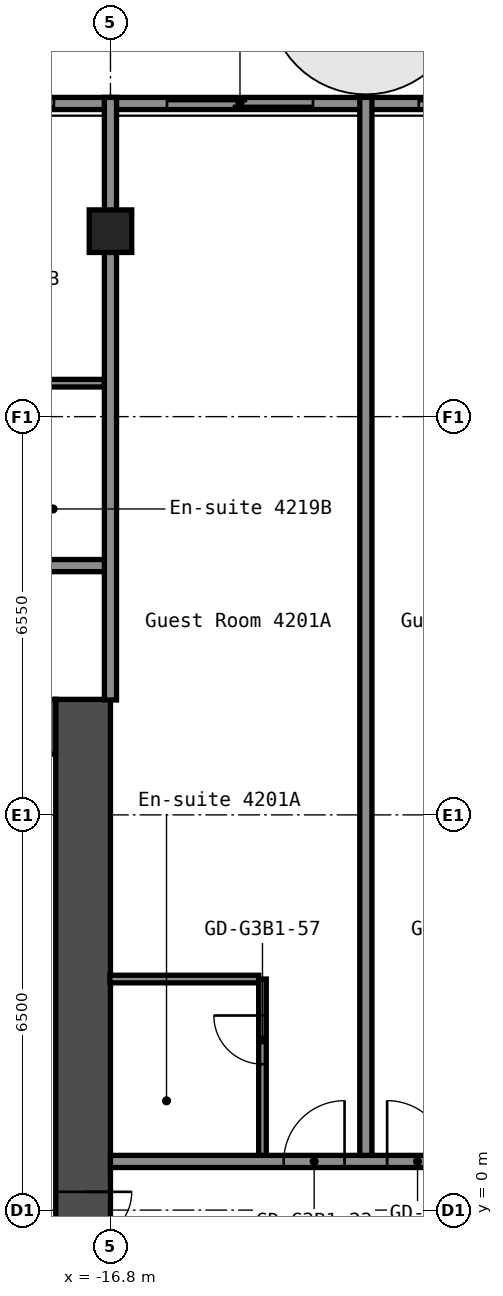
"""IFC4 building model, lengths in metres.
Left out: names, types, materials, properties, quantities, classifications, styles, units other than length and angle.
Written with IfcOpenShell. Run it as: python <this file> out.ifc"""

import sys

from ifc_helpers import new_model, si_unit, direction, frame, frame_2d, origin, origin_2d, place, context, subcontext, project, spatial, rectangle, hollow_rectangle, extrude, element, fill, save


model = new_model("IFC4")
c1 = context("Model", 3, precision=1e-05, world=origin(), true_north=direction((0.0, 1.0)))
c2 = subcontext(c1, "Body", "Model", "MODEL_VIEW")
j1 = project(units=[si_unit("LENGTHUNIT", "METRE"), si_unit("PLANEANGLEUNIT", "RADIAN")], contexts=[c1])
p1 = place(None, origin())
s1 = spatial("IfcSite", under=j1, at=p1, CompositionType="ELEMENT")
p2 = place(p1, origin())
s2 = spatial("IfcBuilding", under=s1, at=p2, CompositionType="ELEMENT")
p3 = place(p2, frame((0.0, 0.0, 150.2)))
s3 = spatial("IfcBuildingStorey", under=s2, at=p3, CompositionType="ELEMENT", Elevation=150.2)
p4 = place(p3, frame((-16.8, 16.1, 0.0), z_axis=(0.0, 0.0, 1.0), x_axis=(1.0, 0.0, 0.0)))
e1 = element("IfcColumn", 1, at=p4, inside=s3, PredefinedType="COLUMN", context=c2, shape_type="SweptSolid", body=[
    extrude(hollow_rectangle(XDim=0.7, YDim=0.7, WallThickness=0.028, at=origin_2d()), origin(), (0.0, 0.0, 1.0), 2.75),
])
p5 = place(p3, frame((-17.25, -8.4, 0.0), z_axis=(0.0, 0.0, 1.0), x_axis=(0.0, 1.0, 0.0)))
e2 = element("IfcWall", 2, at=p5, inside=s3, PredefinedType="SHEAR", context=c2, shape_type="SweptSolid", body=[
    extrude(rectangle(XDim=16.8, YDim=0.9, at=frame_2d((8.4, 0.0))), origin(), (0.0, 0.0, 1.0), 2.75),
])
p6 = place(p5, frame((7.1, 0.0, 0.0)))
e3 = element("IfcOpeningElement", 3, at=p6, cuts=e2, PredefinedType="OPENING", context=c2, shape_type="SweptSolid", body=[
    extrude(rectangle(XDim=1.6, YDim=2.1, at=frame_2d((0.8, 1.05))), frame((0.0, 0.46, 0.0), z_axis=(0.0, -1.0, 0.0), x_axis=(1.0, 0.0, 0.0)), (0.0, 0.0, 1.0), 0.92),
])
p7 = place(p3, frame((-32.7, 7.95, 0.0), z_axis=(0.0, 0.0, 1.0), x_axis=(1.0, 0.0, 0.0)))
e4 = element("IfcWall", 4, at=p7, inside=s3, PredefinedType="SHEAR", context=c2, shape_type="SweptSolid", body=[
    extrude(rectangle(XDim=15.0, YDim=0.9, at=frame_2d((7.5, 0.0))), origin(), (0.0, 0.0, 1.0), 2.75),
])
p8 = place(p7, frame((3.4, 0.0, 0.0)))
e5 = element("IfcOpeningElement", 5, at=p8, cuts=e4, PredefinedType="OPENING", context=c2, shape_type="SweptSolid", body=[
    extrude(rectangle(XDim=1.2, YDim=2.1, at=frame_2d((0.6, 1.05))), frame((0.0, 0.46, 0.0), z_axis=(0.0, -1.0, 0.0), x_axis=(1.0, 0.0, 0.0)), (0.0, 0.0, 1.0), 0.92),
])
p9 = place(p7, frame((0.75, 0.0, 0.0)))
e6 = element("IfcOpeningElement", 6, at=p9, cuts=e4, PredefinedType="OPENING", context=c2, shape_type="SweptSolid", body=[
    extrude(rectangle(XDim=0.9, YDim=2.1, at=frame_2d((0.45, 1.05))), frame((0.0, 0.46, 0.0), z_axis=(0.0, -1.0, 0.0), x_axis=(1.0, 0.0, 0.0)), (0.0, 0.0, 1.0), 0.92),
])
p10 = place(p3, frame((-16.8, 0.8, 0.0), z_axis=(0.0, 0.0, 1.0), x_axis=(1.0, 0.0, 0.0)))
e7 = element("IfcWall", 7, at=p10, inside=s3, PredefinedType="PARTITIONING", context=c2, shape_type="SweptSolid", body=[
    extrude(rectangle(XDim=33.6, YDim=0.2, at=frame_2d((16.8, 0.0))), origin(), (0.0, 0.0, 1.0), 2.75),
])
p11 = place(p10, frame((2.85, 0.0, 0.0)))
e8 = element("IfcOpeningElement", 8, at=p11, cuts=e7, PredefinedType="OPENING", context=c2, shape_type="SweptSolid", body=[
    extrude(rectangle(XDim=1.0, YDim=2.1, at=frame_2d((0.5, 1.05))), frame((0.0, 0.11, 0.0), z_axis=(0.0, -1.0, 0.0), x_axis=(1.0, 0.0, 0.0)), (0.0, 0.0, 1.0), 0.22),
])
p12 = place(p10, frame((4.55, 0.0, 0.0)))
e9 = element("IfcOpeningElement", 9, at=p12, cuts=e7, PredefinedType="OPENING", context=c2, shape_type="SweptSolid", body=[
    extrude(rectangle(XDim=1.0, YDim=2.1, at=frame_2d((0.5, 1.05))), frame((0.0, 0.11, 0.0), z_axis=(0.0, -1.0, 0.0), x_axis=(1.0, 0.0, 0.0)), (0.0, 0.0, 1.0), 0.22),
])
p13 = place(p10, frame((10.22, 0.0, 0.0)))
e10 = element("IfcOpeningElement", 10, at=p13, cuts=e7, PredefinedType="OPENING", context=c2, shape_type="SweptSolid", body=[
    extrude(rectangle(XDim=0.9, YDim=2.1, at=frame_2d((0.45, 1.05))), frame((0.0, 0.11, 0.0), z_axis=(0.0, -1.0, 0.0), x_axis=(1.0, 0.0, 0.0)), (0.0, 0.0, 1.0), 0.22),
])
p14 = place(p10, frame((14.42, 0.0, 0.0)))
e11 = element("IfcOpeningElement", 11, at=p14, cuts=e7, PredefinedType="OPENING", context=c2, shape_type="SweptSolid", body=[
    extrude(rectangle(XDim=0.9, YDim=2.1, at=frame_2d((0.45, 1.05))), frame((0.0, 0.11, 0.0), z_axis=(0.0, -1.0, 0.0), x_axis=(1.0, 0.0, 0.0)), (0.0, 0.0, 1.0), 0.22),
])
p15 = place(p10, frame((19.65, 0.0, 0.0)))
e12 = element("IfcOpeningElement", 12, at=p15, cuts=e7, PredefinedType="OPENING", context=c2, shape_type="SweptSolid", body=[
    extrude(rectangle(XDim=1.0, YDim=2.1, at=frame_2d((0.5, 1.05))), frame((0.0, 0.11, 0.0), z_axis=(0.0, -1.0, 0.0), x_axis=(1.0, 0.0, 0.0)), (0.0, 0.0, 1.0), 0.22),
])
p16 = place(p10, frame((21.35, 0.0, 0.0)))
e13 = element("IfcOpeningElement", 13, at=p16, cuts=e7, PredefinedType="OPENING", context=c2, shape_type="SweptSolid", body=[
    extrude(rectangle(XDim=1.0, YDim=2.1, at=frame_2d((0.5, 1.05))), frame((0.0, 0.11, 0.0), z_axis=(0.0, -1.0, 0.0), x_axis=(1.0, 0.0, 0.0)), (0.0, 0.0, 1.0), 0.22),
])
p17 = place(p10, frame((28.05, 0.0, 0.0)))
e14 = element("IfcOpeningElement", 14, at=p17, cuts=e7, PredefinedType="OPENING", context=c2, shape_type="SweptSolid", body=[
    extrude(rectangle(XDim=1.0, YDim=2.1, at=frame_2d((0.5, 1.05))), frame((0.0, 0.11, 0.0), z_axis=(0.0, -1.0, 0.0), x_axis=(1.0, 0.0, 0.0)), (0.0, 0.0, 1.0), 0.22),
])
p18 = place(p10, frame((29.75, 0.0, 0.0)))
e15 = element("IfcOpeningElement", 15, at=p18, cuts=e7, PredefinedType="OPENING", context=c2, shape_type="SweptSolid", body=[
    extrude(rectangle(XDim=1.0, YDim=2.1, at=frame_2d((0.5, 1.05))), frame((0.0, 0.11, 0.0), z_axis=(0.0, -1.0, 0.0), x_axis=(1.0, 0.0, 0.0)), (0.0, 0.0, 1.0), 0.22),
])
p19 = place(p3, frame((-16.81, 3.8, 0.0), z_axis=(0.0, 0.0, 1.0), x_axis=(1.0, 0.0, 0.0)))
e16 = element("IfcWall", 16, at=p19, inside=s3, PredefinedType="PARTITIONING", context=c2, shape_type="SweptSolid", body=[
    extrude(rectangle(XDim=2.448, YDim=0.125, at=frame_2d((1.224, 0.0))), origin(), (0.0, 0.0, 1.0), 2.75),
])
p20 = place(p3, frame((-42.7, 10.6, 0.0), z_axis=(0.0, 0.0, 1.0), x_axis=(1.0, 0.0, 0.0)))
e17 = element("IfcWall", 17, at=p20, inside=s3, PredefinedType="PARTITIONING", context=c2, shape_type="SweptSolid", body=[
    extrude(rectangle(XDim=25.9, YDim=0.2, at=frame_2d((12.95, 0.0))), origin(), (0.0, 0.0, 1.0), 2.75),
])
p21 = place(p20, frame((3.25, 0.0, 0.0)))
e18 = element("IfcOpeningElement", 18, at=p21, cuts=e17, PredefinedType="OPENING", context=c2, shape_type="SweptSolid", body=[
    extrude(rectangle(XDim=1.0, YDim=2.1, at=frame_2d((0.5, 1.05))), frame((0.0, 0.11, 0.0), z_axis=(0.0, -1.0, 0.0), x_axis=(1.0, 0.0, 0.0)), (0.0, 0.0, 1.0), 0.22),
])
p22 = place(p20, frame((5.15, 0.0, 0.0)))
e19 = element("IfcOpeningElement", 19, at=p22, cuts=e17, PredefinedType="OPENING", context=c2, shape_type="SweptSolid", body=[
    extrude(rectangle(XDim=1.0, YDim=2.1, at=frame_2d((0.5, 1.05))), frame((0.0, 0.11, 0.0), z_axis=(0.0, -1.0, 0.0), x_axis=(1.0, 0.0, 0.0)), (0.0, 0.0, 1.0), 0.22),
])
p23 = place(p20, frame((11.95, 0.0, 0.0)))
e20 = element("IfcOpeningElement", 20, at=p23, cuts=e17, PredefinedType="OPENING", context=c2, shape_type="SweptSolid", body=[
    extrude(rectangle(XDim=1.0, YDim=2.1, at=frame_2d((0.5, 1.05))), frame((0.0, 0.11, 0.0), z_axis=(0.0, -1.0, 0.0), x_axis=(1.0, 0.0, 0.0)), (0.0, 0.0, 1.0), 0.22),
])
p24 = place(p20, frame((13.65, 0.0, 0.0)))
e21 = element("IfcOpeningElement", 21, at=p24, cuts=e17, PredefinedType="OPENING", context=c2, shape_type="SweptSolid", body=[
    extrude(rectangle(XDim=1.0, YDim=2.1, at=frame_2d((0.5, 1.05))), frame((0.0, 0.11, 0.0), z_axis=(0.0, -1.0, 0.0), x_axis=(1.0, 0.0, 0.0)), (0.0, 0.0, 1.0), 0.22),
])
p25 = place(p20, frame((20.35, 0.0, 0.0)))
e22 = element("IfcOpeningElement", 22, at=p25, cuts=e17, PredefinedType="OPENING", context=c2, shape_type="SweptSolid", body=[
    extrude(rectangle(XDim=1.0, YDim=2.1, at=frame_2d((0.5, 1.05))), frame((0.0, 0.11, 0.0), z_axis=(0.0, -1.0, 0.0), x_axis=(1.0, 0.0, 0.0)), (0.0, 0.0, 1.0), 0.22),
])
p26 = place(p20, frame((22.05, 0.0, 0.0)))
e23 = element("IfcOpeningElement", 23, at=p26, cuts=e17, PredefinedType="OPENING", context=c2, shape_type="SweptSolid", body=[
    extrude(rectangle(XDim=1.0, YDim=2.1, at=frame_2d((0.5, 1.05))), frame((0.0, 0.11, 0.0), z_axis=(0.0, -1.0, 0.0), x_axis=(1.0, 0.0, 0.0)), (0.0, 0.0, 1.0), 0.22),
])
p27 = place(p3, frame((-19.238, 13.6, 0.0), z_axis=(0.0, 0.0, 1.0), x_axis=(1.0, 0.0, 0.0)))
e24 = element("IfcWall", 24, at=p27, inside=s3, PredefinedType="PARTITIONING", context=c2, shape_type="SweptSolid", body=[
    extrude(rectangle(XDim=2.338, YDim=0.125, at=frame_2d((1.169, 0.0))), origin(), (0.0, 0.0, 1.0), 2.75),
])
p28 = place(p3, frame((-16.8, 8.39, 0.0), z_axis=(0.0, 0.0, 1.0), x_axis=(0.0, 1.0, 0.0)))
e25 = element("IfcWall", 25, at=p28, inside=s3, PredefinedType="PARTITIONING", context=c2, shape_type="SweptSolid", body=[
    extrude(rectangle(XDim=9.91, YDim=0.2, at=frame_2d((4.955, 0.0))), origin(), (0.0, 0.0, 1.0), 2.75),
])
p29 = place(p3, frame((-14.3, 0.9, 0.0), z_axis=(0.0, 0.0, 1.0), x_axis=(0.0, 1.0, 0.0)))
e26 = element("IfcWall", 26, at=p29, inside=s3, PredefinedType="PARTITIONING", context=c2, shape_type="SweptSolid", body=[
    extrude(rectangle(XDim=2.9, YDim=0.125, at=frame_2d((1.45, 0.0))), origin(), (0.0, 0.0, 1.0), 2.75),
])
p30 = place(p29, frame((1.5, 0.0, 0.0)))
e27 = element("IfcOpeningElement", 27, at=p30, cuts=e26, PredefinedType="OPENING", context=c2, shape_type="SweptSolid", body=[
    extrude(rectangle(XDim=0.8, YDim=2.1, at=frame_2d((0.4, 1.05))), frame((0.0, 0.073, 0.0), z_axis=(0.0, -1.0, 0.0), x_axis=(1.0, 0.0, 0.0)), (0.0, 0.0, 1.0), 0.145),
])
p31 = place(p3, frame((-12.6, 0.9, 0.0), z_axis=(0.0, 0.0, 1.0), x_axis=(0.0, 1.0, 0.0)))
e28 = element("IfcWall", 28, at=p31, inside=s3, PredefinedType="PARTITIONING", context=c2, shape_type="SweptSolid", body=[
    extrude(rectangle(XDim=17.4, YDim=0.2, at=frame_2d((8.7, 0.0))), origin(), (0.0, 0.0, 1.0), 2.75),
])
p32 = place(p3, frame((-8.42, 18.2, 0.0), z_axis=(0.0, 0.0, 1.0), x_axis=(-1.0, 0.0, 0.0)))
p33 = place(p32, frame((0.91, 0.0, 0.0)))
p34 = place(p33, frame((2.4, 0.0, 0.0), z_axis=(0.0, 0.0, 1.0), x_axis=(-1.0, 0.0, 0.0)))
e29 = element("IfcDoor", 29, at=p34, inside=s3, OperationType="SLIDING_TO_LEFT", PredefinedType="DOOR", context=c2, shape_type="SweptSolid", body=[
    extrude(rectangle(XDim=2.4, YDim=2.2, at=frame_2d((1.2, 1.1))), frame((0.0, 0.025, 0.0), z_axis=(0.0, -1.0, 0.0), x_axis=(1.0, 0.0, 0.0)), (0.0, 0.0, 1.0), 0.05),
])
p35 = place(p3, frame((-12.56, 18.2, 0.0), z_axis=(0.0, 0.0, 1.0), x_axis=(-1.0, 0.0, 0.0)))
p36 = place(p35, frame((0.91, 0.0, 0.0)))
p37 = place(p36, frame((2.4, 0.0, 0.0), z_axis=(0.0, 0.0, 1.0), x_axis=(-1.0, 0.0, 0.0)))
e30 = element("IfcDoor", 30, at=p37, inside=s3, OperationType="SLIDING_TO_LEFT", PredefinedType="DOOR", context=c2, shape_type="SweptSolid", body=[
    extrude(rectangle(XDim=2.4, YDim=2.2, at=frame_2d((1.2, 1.1))), frame((0.0, 0.025, 0.0), z_axis=(0.0, -1.0, 0.0), x_axis=(1.0, 0.0, 0.0)), (0.0, 0.0, 1.0), 0.05),
])
p38 = place(p3, frame((-16.82, 18.2, 0.0), z_axis=(0.0, 0.0, 1.0), x_axis=(-1.0, 0.0, 0.0)))
p39 = place(p38, frame((0.91, 0.0, 0.0)))
p40 = place(p39, frame((2.4, 0.0, 0.0), z_axis=(0.0, 0.0, 1.0), x_axis=(-1.0, 0.0, 0.0)))
e31 = element("IfcDoor", 31, at=p40, inside=s3, OperationType="SLIDING_TO_LEFT", PredefinedType="DOOR", context=c2, shape_type="SweptSolid", body=[
    extrude(rectangle(XDim=2.4, YDim=2.2, at=frame_2d((1.2, 1.1))), frame((0.0, 0.025, 0.0), z_axis=(0.0, -1.0, 0.0), x_axis=(1.0, 0.0, 0.0)), (0.0, 0.0, 1.0), 0.05),
])
p41 = place(p6, origin())
e32 = element("IfcDoor", 32, at=p41, inside=s3, OperationType="DOUBLE_DOOR_SINGLE_SWING", PredefinedType="DOOR", context=c2, shape_type="SweptSolid", body=[
    extrude(rectangle(XDim=1.6, YDim=2.1, at=frame_2d((0.8, 1.05))), frame((0.0, 0.025, 0.0), z_axis=(0.0, -1.0, 0.0), x_axis=(1.0, 0.0, 0.0)), (0.0, 0.0, 1.0), 0.05),
])
fill(e3, e32)
p42 = place(p11, origin())
e33 = element("IfcDoor", 33, at=p42, inside=s3, OperationType="SINGLE_SWING_LEFT", PredefinedType="DOOR", context=c2, shape_type="SweptSolid", body=[
    extrude(rectangle(XDim=1.0, YDim=2.1, at=frame_2d((0.5, 1.05))), frame((0.0, 0.025, 0.0), z_axis=(0.0, -1.0, 0.0), x_axis=(1.0, 0.0, 0.0)), (0.0, 0.0, 1.0), 0.05),
])
fill(e8, e33)
p43 = place(p12, origin())
e34 = element("IfcDoor", 34, at=p43, inside=s3, OperationType="SINGLE_SWING_RIGHT", PredefinedType="DOOR", context=c2, shape_type="SweptSolid", body=[
    extrude(rectangle(XDim=1.0, YDim=2.1, at=frame_2d((0.5, 1.05))), frame((0.0, 0.025, 0.0), z_axis=(0.0, -1.0, 0.0), x_axis=(1.0, 0.0, 0.0)), (0.0, 0.0, 1.0), 0.05),
])
fill(e9, e34)
p44 = place(p30, origin())
e35 = element("IfcDoor", 35, at=p44, inside=s3, OperationType="SINGLE_SWING_LEFT", PredefinedType="DOOR", context=c2, shape_type="SweptSolid", body=[
    extrude(rectangle(XDim=0.8, YDim=2.1, at=frame_2d((0.4, 1.05))), frame((0.0, 0.025, 0.0), z_axis=(0.0, -1.0, 0.0), x_axis=(1.0, 0.0, 0.0)), (0.0, 0.0, 1.0), 0.05),
])
fill(e27, e35)
save(model, sys.argv[1])
